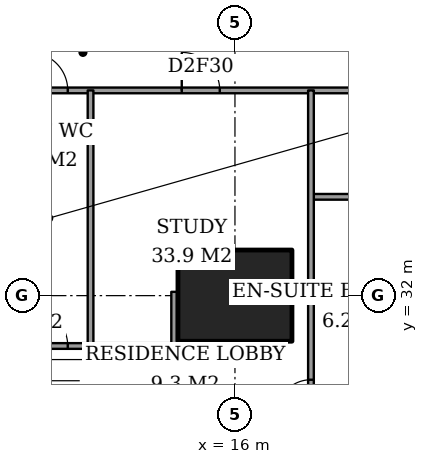
"""IFC4 building model, lengths in metres.
Left out: names, types, materials, properties, quantities, classifications, styles, units other than length and angle.
Written with IfcOpenShell. Run it as: python <this file> out.ifc"""

import sys

from ifc_helpers import new_model, si_unit, direction, frame, frame_2d, origin, origin_2d, place, context, subcontext, project, spatial, rectangle, extrude, element, fill, save


model = new_model("IFC4")
c1 = context("Model", 3, precision=1e-05, world=origin(), true_north=direction((0.0, 1.0)))
c2 = subcontext(c1, "Body", "Model", "MODEL_VIEW")
j1 = project(units=[si_unit("LENGTHUNIT", "METRE"), si_unit("PLANEANGLEUNIT", "RADIAN")], contexts=[c1])
p1 = place(None, origin())
s1 = spatial("IfcSite", under=j1, at=p1, CompositionType="ELEMENT")
p2 = place(p1, origin())
s2 = spatial("IfcBuilding", under=s1, at=p2, CompositionType="ELEMENT")
p3 = place(p2, frame((0.0, 0.0, 80.0)))
s3 = spatial("IfcBuildingStorey", under=s2, at=p3, CompositionType="ELEMENT", Elevation=80.0)
p4 = place(p3, frame((16.0, 32.0, 0.0), z_axis=(0.0, 0.0, 1.0), x_axis=(1.0, 0.0, 0.0)))
e1 = element("IfcColumn", 1, at=p4, inside=s3, PredefinedType="COLUMN", context=c2, shape_type="SweptSolid", body=[
    extrude(rectangle(XDim=3.0, YDim=2.4, at=origin_2d()), origin(), (0.0, 0.0, 1.0), 3.6),
])
p5 = place(p3, frame((10.0, 30.675, 0.0), z_axis=(0.0, 0.0, 1.0), x_axis=(1.0, 0.0, 0.0)))
e2 = element("IfcWall", 2, at=p5, inside=s3, PredefinedType="PARTITIONING", context=c2, shape_type="SweptSolid", body=[
    extrude(rectangle(XDim=4.4, YDim=0.15, at=frame_2d((2.2, 0.0))), origin(), (0.0, 0.0, 1.0), 3.35),
])
p6 = place(p5, frame((0.6, 0.0, 0.0)))
e3 = element("IfcOpeningElement", 3, at=p6, cuts=e2, PredefinedType="OPENING", context=c2, shape_type="SweptSolid", body=[
    extrude(rectangle(XDim=1.0, YDim=2.1, at=frame_2d((0.5, 1.05))), frame((0.0, 0.085, 0.0), z_axis=(0.0, -1.0, 0.0), x_axis=(1.0, 0.0, 0.0)), (0.0, 0.0, 1.0), 0.17),
])
p7 = place(p3, frame((18.0, 32.0, 0.0), z_axis=(0.0, 0.0, 1.0), x_axis=(1.0, 0.0, 0.0)))
e4 = element("IfcWall", 4, at=p7, inside=s3, PredefinedType="PARTITIONING", context=c2, shape_type="SweptSolid", body=[
    extrude(rectangle(XDim=6.0, YDim=0.15, at=frame_2d((3.0, 0.0))), origin(), (0.0, 0.0, 1.0), 2.634),
])
p8 = place(p3, frame((17.5, 32.1, 0.0), z_axis=(0.0, 0.0, 1.0), x_axis=(1.0, 0.0, 0.0)))
e5 = element("IfcWall", 5, at=p8, inside=s3, PredefinedType="PARTITIONING", context=c2, shape_type="SweptSolid", body=[
    extrude(rectangle(XDim=0.5, YDim=0.15, at=frame_2d((0.25, 0.0))), origin(), (0.0, 0.0, 1.0), 2.634),
])
p9 = place(p3, frame((18.0, 34.6, 0.0), z_axis=(0.0, 0.0, 1.0), x_axis=(1.0, 0.0, 0.0)))
e6 = element("IfcWall", 6, at=p9, inside=s3, PredefinedType="PARTITIONING", context=c2, shape_type="SweptSolid", body=[
    extrude(rectangle(XDim=2.4, YDim=0.15, at=frame_2d((1.2, 0.0))), origin(), (0.0, 0.0, 1.0), 3.35),
])
p10 = place(p3, frame((10.0, 37.4, 0.0), z_axis=(0.0, 0.0, 1.0), x_axis=(1.0, 0.0, 0.0)))
e7 = element("IfcWall", 7, at=p10, inside=s3, PredefinedType="PARTITIONING", context=c2, shape_type="SweptSolid", body=[
    extrude(rectangle(XDim=14.561, YDim=0.15, at=frame_2d((7.281, 0.0))), origin(), (0.0, 0.0, 1.0), 3.35),
])
p11 = place(p10, frame((0.6, 0.0, 0.0)))
e8 = element("IfcOpeningElement", 8, at=p11, cuts=e7, PredefinedType="OPENING", context=c2, shape_type="SweptSolid", body=[
    extrude(rectangle(XDim=1.0, YDim=2.1, at=frame_2d((0.5, 1.05))), frame((0.0, 0.085, 0.0), z_axis=(0.0, -1.0, 0.0), x_axis=(1.0, 0.0, 0.0)), (0.0, 0.0, 1.0), 0.17),
])
p12 = place(p10, frame((4.6, 0.0, 0.0)))
e9 = element("IfcOpeningElement", 9, at=p12, cuts=e7, PredefinedType="OPENING", context=c2, shape_type="SweptSolid", body=[
    extrude(rectangle(XDim=1.0, YDim=2.1, at=frame_2d((0.5, 1.05))), frame((0.0, 0.085, 0.0), z_axis=(0.0, -1.0, 0.0), x_axis=(1.0, 0.0, 0.0)), (0.0, 0.0, 1.0), 0.17),
])
p13 = place(p10, frame((10.725, 0.0, 0.0)))
e10 = element("IfcOpeningElement", 10, at=p13, cuts=e7, PredefinedType="OPENING", context=c2, shape_type="SweptSolid", body=[
    extrude(rectangle(XDim=1.0, YDim=2.1, at=frame_2d((0.5, 1.05))), frame((0.0, 0.085, 0.0), z_axis=(0.0, -1.0, 0.0), x_axis=(1.0, 0.0, 0.0)), (0.0, 0.0, 1.0), 0.17),
])
p14 = place(p3, frame((12.2, 30.675, 0.0), z_axis=(0.0, 0.0, 1.0), x_axis=(0.0, 1.0, 0.0)))
e11 = element("IfcWall", 11, at=p14, inside=s3, PredefinedType="PARTITIONING", context=c2, shape_type="SweptSolid", body=[
    extrude(rectangle(XDim=6.725, YDim=0.15, at=frame_2d((3.362, 0.0))), origin(), (0.0, 0.0, 1.0), 3.35),
])
p15 = place(p3, frame((14.4, 30.675, 0.0), z_axis=(0.0, 0.0, 1.0), x_axis=(0.0, 1.0, 0.0)))
e12 = element("IfcWall", 12, at=p15, inside=s3, PredefinedType="PARTITIONING", context=c2, shape_type="SweptSolid", body=[
    extrude(rectangle(XDim=1.425, YDim=0.15, at=frame_2d((0.712, 0.0))), origin(), (0.0, 0.0, 1.0), 3.35),
])
p16 = place(p3, frame((18.0, 28.0, 0.0), z_axis=(0.0, 0.0, 1.0), x_axis=(0.0, 1.0, 0.0)))
e13 = element("IfcWall", 13, at=p16, inside=s3, PredefinedType="PARTITIONING", context=c2, shape_type="SweptSolid", body=[
    extrude(rectangle(XDim=9.4, YDim=0.15, at=frame_2d((4.7, 0.0))), origin(), (0.0, 0.0, 1.0), 3.35),
])
p17 = place(p16, frame((0.887, 0.0, 0.0)))
e14 = element("IfcOpeningElement", 14, at=p17, cuts=e13, PredefinedType="OPENING", context=c2, shape_type="SweptSolid", body=[
    extrude(rectangle(XDim=0.9, YDim=2.1, at=frame_2d((0.45, 1.05))), frame((0.0, 0.085, 0.0), z_axis=(0.0, -1.0, 0.0), x_axis=(1.0, 0.0, 0.0)), (0.0, 0.0, 1.0), 0.17),
])
p18 = place(p11, origin())
e15 = element("IfcDoor", 15, at=p18, inside=s3, OperationType="SINGLE_SWING_RIGHT", PredefinedType="DOOR", context=c2, shape_type="SweptSolid", body=[
    extrude(rectangle(XDim=1.0, YDim=2.1, at=frame_2d((0.5, 1.05))), frame((0.0, 0.025, 0.0), z_axis=(0.0, -1.0, 0.0), x_axis=(1.0, 0.0, 0.0)), (0.0, 0.0, 1.0), 0.05),
])
fill(e8, e15)
p19 = place(p6, origin())
e16 = element("IfcDoor", 16, at=p19, inside=s3, OperationType="SINGLE_SWING_RIGHT", PredefinedType="DOOR", context=c2, shape_type="SweptSolid", body=[
    extrude(rectangle(XDim=1.0, YDim=2.1, at=frame_2d((0.5, 1.05))), frame((0.0, 0.025, 0.0), z_axis=(0.0, -1.0, 0.0), x_axis=(1.0, 0.0, 0.0)), (0.0, 0.0, 1.0), 0.05),
])
fill(e3, e16)
p20 = place(p12, origin())
e17 = element("IfcDoor", 17, at=p20, inside=s3, OperationType="SINGLE_SWING_RIGHT", PredefinedType="DOOR", context=c2, shape_type="SweptSolid", body=[
    extrude(rectangle(XDim=1.0, YDim=2.1, at=frame_2d((0.5, 1.05))), frame((0.0, 0.025, 0.0), z_axis=(0.0, -1.0, 0.0), x_axis=(1.0, 0.0, 0.0)), (0.0, 0.0, 1.0), 0.05),
])
fill(e9, e17)
p21 = place(p17, origin())
e18 = element("IfcDoor", 18, at=p21, inside=s3, OperationType="SINGLE_SWING_RIGHT", PredefinedType="DOOR", context=c2, shape_type="SweptSolid", body=[
    extrude(rectangle(XDim=0.9, YDim=2.1, at=frame_2d((0.45, 1.05))), frame((0.0, 0.025, 0.0), z_axis=(0.0, -1.0, 0.0), x_axis=(1.0, 0.0, 0.0)), (0.0, 0.0, 1.0), 0.05),
])
fill(e14, e18)
save(model, sys.argv[1])
